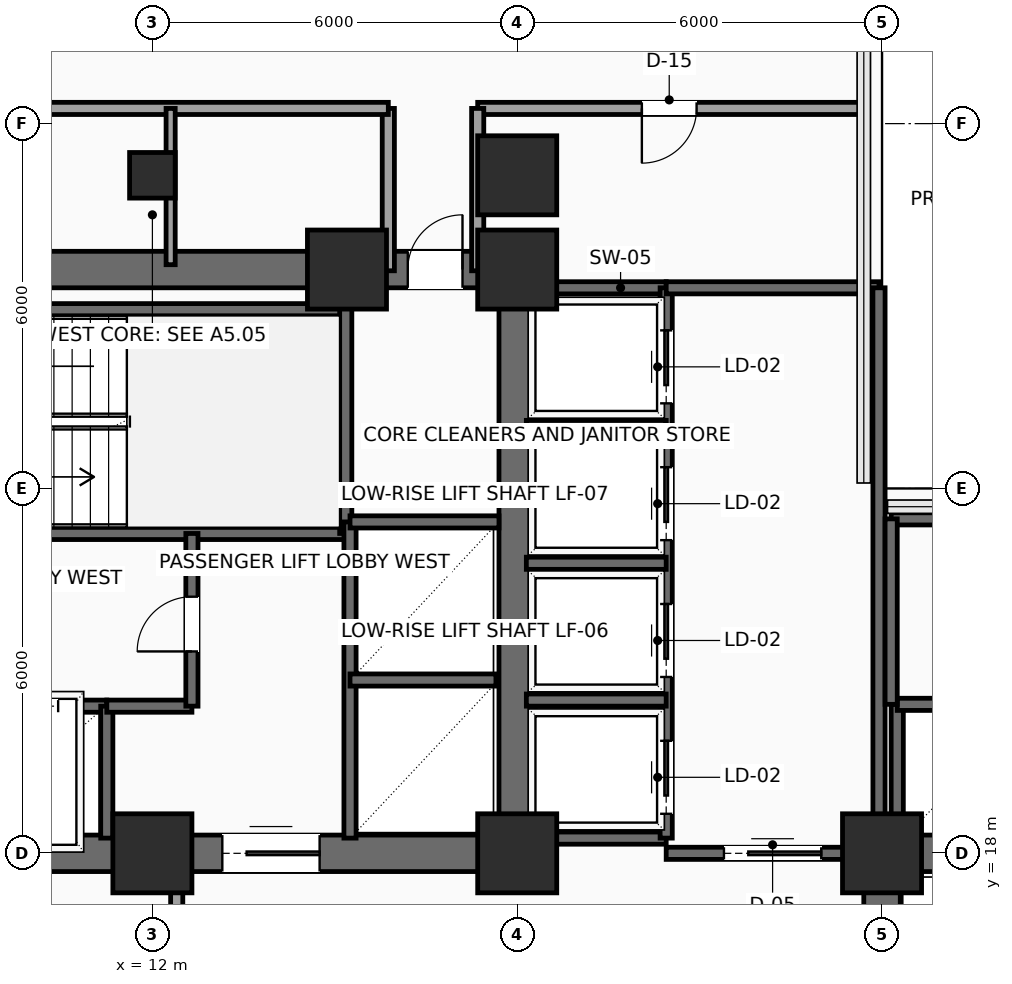
"""IFC4 building model, lengths in metres.
Left out: names, types, materials, properties, quantities, classifications, styles, units other than length and angle.
Written with IfcOpenShell. Run it as: python <this file> out.ifc"""

import sys

from ifc_helpers import new_model, si_unit, direction, frame, frame_2d, origin, origin_2d, place, context, subcontext, project, spatial, rectangle, hollow_rectangle, extrude, element, fill, save


model = new_model("IFC4")
c1 = context("Model", 3, precision=1e-05, world=origin(), true_north=direction((0.0, 1.0)))
c2 = subcontext(c1, "Body", "Model", "MODEL_VIEW")
j1 = project(units=[si_unit("LENGTHUNIT", "METRE"), si_unit("PLANEANGLEUNIT", "RADIAN")], contexts=[c1])
p1 = place(None, origin())
s1 = spatial("IfcSite", under=j1, at=p1, CompositionType="ELEMENT")
p2 = place(p1, origin())
s2 = spatial("IfcBuilding", under=s1, at=p2, CompositionType="ELEMENT")
p3 = place(p2, frame((0.0, 0.0, 87.0)))
s3 = spatial("IfcBuildingStorey", under=s2, at=p3, CompositionType="ELEMENT", Elevation=87.0)
for number, where, z_axis, x_axis in (
    (1, (12.0, 18.0, 0.0), (0.0, 0.0, 1.0), (1.0, 0.0, 0.0)),
    (2, (18.0, 18.0, 0.0), (0.0, 0.0, 1.0), (1.0, 0.0, 0.0)),
    (3, (15.2, 27.6, 0.0), (0.0, 0.0, 1.0), (1.0, 0.0, 0.0)),
    (4, (18.0, 27.6, 0.0), (0.0, 0.0, 1.0), (1.0, 0.0, 0.0)),
    (5, (24.0, 18.0, 0.0), (0.0, 0.0, 1.0), (1.0, 0.0, 0.0)),
):
    element("IfcColumn", number, at=place(p3, frame(where, z_axis=z_axis, x_axis=x_axis)), inside=s3, PredefinedType="COLUMN", context=c2, shape_type="SweptSolid", body=[
        extrude(rectangle(XDim=1.3, YDim=1.3, at=origin_2d()), origin(), (0.0, 0.0, 1.0), 3.9),
    ])
p4 = place(p3, frame((12.0, 29.15, 0.0), z_axis=(0.0, 0.0, 1.0), x_axis=(1.0, 0.0, 0.0)))
e6 = element("IfcColumn", 6, at=p4, inside=s3, PredefinedType="COLUMN", context=c2, shape_type="SweptSolid", body=[
    extrude(hollow_rectangle(XDim=0.75, YDim=0.75, WallThickness=0.035, InnerFilletRadius=0.035, OuterFilletRadius=0.05, at=origin_2d()), origin(), (0.0, 0.0, 1.0), 3.9),
])
p5 = place(p3, frame((18.0, 29.15, 0.0), z_axis=(0.0, 0.0, 1.0), x_axis=(1.0, 0.0, 0.0)))
e7 = element("IfcColumn", 7, at=p5, inside=s3, PredefinedType="COLUMN", context=c2, shape_type="SweptSolid", body=[
    extrude(rectangle(XDim=1.3, YDim=1.3, at=origin_2d()), origin(), (0.0, 0.0, 1.0), 3.9),
])
p6 = place(p3, frame((6.0, 18.0, 0.0), z_axis=(0.0, 0.0, 1.0), x_axis=(1.0, 0.0, 0.0)))
e8 = element("IfcWall", 8, at=p6, inside=s3, PredefinedType="SHEAR", context=c2, shape_type="SweptSolid", body=[
    extrude(rectangle(XDim=12.0, YDim=0.6, at=frame_2d((6.0, 0.0))), origin(), (0.0, 0.0, 1.0), 3.65),
])
p7 = place(p6, frame((7.15, 0.0, 0.0)))
e9 = element("IfcOpeningElement", 9, at=p7, cuts=e8, PredefinedType="OPENING", context=c2, shape_type="SweptSolid", body=[
    extrude(rectangle(XDim=1.6, YDim=2.3, at=frame_2d((0.8, 1.15))), frame((0.0, 0.31, 0.0), z_axis=(0.0, -1.0, 0.0), x_axis=(1.0, 0.0, 0.0)), (0.0, 0.0, 1.0), 0.62),
])
p8 = place(p3, frame((6.0, 27.6, 0.0), z_axis=(0.0, 0.0, 1.0), x_axis=(1.0, 0.0, 0.0)))
e10 = element("IfcWall", 10, at=p8, inside=s3, PredefinedType="SHEAR", context=c2, shape_type="SweptSolid", body=[
    extrude(rectangle(XDim=12.0, YDim=0.6, at=frame_2d((6.0, 0.0))), origin(), (0.0, 0.0, 1.0), 3.65),
])
p9 = place(p8, frame((10.2, 0.0, 0.0)))
e11 = element("IfcOpeningElement", 11, at=p9, cuts=e10, PredefinedType="OPENING", context=c2, shape_type="SweptSolid", body=[
    extrude(rectangle(XDim=0.9, YDim=2.15, at=frame_2d((0.45, 1.075))), frame((0.0, 0.31, 0.0), z_axis=(0.0, -1.0, 0.0), x_axis=(1.0, 0.0, 0.0)), (0.0, 0.0, 1.0), 0.62),
])
for number, where, z_axis, x_axis in (
    (12, (18.0, 18.0, 0.0), (0.0, 0.0, 1.0), (0.0, 1.0, 0.0)),
    (13, (24.0, 18.0, 0.0), (0.0, 0.0, 1.0), (1.0, 0.0, 0.0)),
):
    element("IfcWall", number, at=place(p3, frame(where, z_axis=z_axis, x_axis=x_axis)), inside=s3, PredefinedType="SHEAR", context=c2, shape_type="SweptSolid", body=[
        extrude(rectangle(XDim=9.6, YDim=0.6, at=frame_2d((4.8, 0.0))), origin(), (0.0, 0.0, 1.0), 3.65),
    ])
p10 = place(p3, frame((24.0, 6.0, 0.0), z_axis=(0.0, 0.0, 1.0), x_axis=(0.0, 1.0, 0.0)))
e14 = element("IfcWall", 14, at=p10, inside=s3, PredefinedType="SHEAR", context=c2, shape_type="SweptSolid", body=[
    extrude(rectangle(XDim=12.0, YDim=0.6, at=frame_2d((6.0, 0.0))), origin(), (0.0, 0.0, 1.0), 3.65),
])
p11 = place(p10, frame((7.15, 0.0, 0.0)))
e15 = element("IfcOpeningElement", 15, at=p11, cuts=e14, PredefinedType="OPENING", context=c2, shape_type="SweptSolid", body=[
    extrude(rectangle(XDim=1.6, YDim=2.3, at=frame_2d((0.8, 1.15))), frame((0.0, 0.31, 0.0), z_axis=(0.0, -1.0, 0.0), x_axis=(1.0, 0.0, 0.0)), (0.0, 0.0, 1.0), 0.62),
])
p12 = place(p3, frame((6.3, 23.26, 0.0), z_axis=(0.0, 0.0, 1.0), x_axis=(1.0, 0.0, 0.0)))
e16 = element("IfcWall", 16, at=p12, inside=s3, PredefinedType="SHEAR", context=c2, shape_type="SweptSolid", body=[
    extrude(rectangle(XDim=8.88, YDim=0.2, at=frame_2d((4.44, 0.0))), origin(), (0.0, 0.0, 1.0), 3.65),
])
p13 = place(p12, frame((0.35, 0.0, 0.0)))
e17 = element("IfcOpeningElement", 17, at=p13, cuts=e16, PredefinedType="OPENING", context=c2, shape_type="SweptSolid", body=[
    extrude(rectangle(XDim=1.1, YDim=2.2, at=frame_2d((0.55, 1.1))), frame((0.0, 0.11, 0.0), z_axis=(0.0, -1.0, 0.0), x_axis=(1.0, 0.0, 0.0)), (0.0, 0.0, 1.0), 0.22),
])
p14 = place(p3, frame((6.3, 26.94, 0.0), z_axis=(0.0, 0.0, 1.0), x_axis=(1.0, 0.0, 0.0)))
e18 = element("IfcWall", 18, at=p14, inside=s3, PredefinedType="SHEAR", context=c2, shape_type="SweptSolid", body=[
    extrude(rectangle(XDim=8.88, YDim=0.2, at=frame_2d((4.44, 0.0))), origin(), (0.0, 0.0, 1.0), 3.65),
])
p15 = place(p3, frame((15.18, 23.26, 0.0), z_axis=(0.0, 0.0, 1.0), x_axis=(0.0, 1.0, 0.0)))
e19 = element("IfcWall", 19, at=p15, inside=s3, PredefinedType="SHEAR", context=c2, shape_type="SweptSolid", body=[
    extrude(rectangle(XDim=4.04, YDim=0.2, at=frame_2d((2.02, 0.0))), origin(), (0.0, 0.0, 1.0), 3.65),
])
p16 = place(p3, frame((6.3, 20.42, 0.0), z_axis=(0.0, 0.0, 1.0), x_axis=(1.0, 0.0, 0.0)))
e20 = element("IfcWall", 20, at=p16, inside=s3, PredefinedType="SHEAR", context=c2, shape_type="SweptSolid", body=[
    extrude(rectangle(XDim=4.95, YDim=0.2, at=frame_2d((2.475, 0.0))), origin(), (0.0, 0.0, 1.0), 3.65),
])
p17 = place(p16, frame((0.65, 0.0, 0.0)))
e21 = element("IfcOpeningElement", 21, at=p17, cuts=e20, PredefinedType="OPENING", context=c2, shape_type="SweptSolid", body=[
    extrude(rectangle(XDim=1.1, YDim=2.2, at=frame_2d((0.55, 1.1))), frame((0.0, 0.11, 0.0), z_axis=(0.0, -1.0, 0.0), x_axis=(1.0, 0.0, 0.0)), (0.0, 0.0, 1.0), 0.22),
])
p18 = place(p16, frame((3.05, 0.0, 0.0)))
e22 = element("IfcOpeningElement", 22, at=p18, cuts=e20, PredefinedType="OPENING", context=c2, shape_type="SweptSolid", body=[
    extrude(rectangle(XDim=1.1, YDim=2.2, at=frame_2d((0.55, 1.1))), frame((0.0, 0.11, 0.0), z_axis=(0.0, -1.0, 0.0), x_axis=(1.0, 0.0, 0.0)), (0.0, 0.0, 1.0), 0.22),
])
p19 = place(p3, frame((11.25, 18.25, 0.0), z_axis=(0.0, 0.0, 1.0), x_axis=(0.0, 1.0, 0.0)))
e23 = element("IfcWall", 23, at=p19, inside=s3, PredefinedType="SHEAR", context=c2, shape_type="SweptSolid", body=[
    extrude(rectangle(XDim=2.17, YDim=0.2, at=frame_2d((1.085, 0.0))), origin(), (0.0, 0.0, 1.0), 3.65),
])
p20 = place(p3, frame((11.25, 20.42, 0.0), z_axis=(0.0, 0.0, 1.0), x_axis=(1.0, 0.0, 0.0)))
e24 = element("IfcWall", 24, at=p20, inside=s3, PredefinedType="SHEAR", context=c2, shape_type="SweptSolid", body=[
    extrude(rectangle(XDim=1.4, YDim=0.2, at=frame_2d((0.7, 0.0))), origin(), (0.0, 0.0, 1.0), 3.65),
])
p21 = place(p3, frame((12.65, 20.42, 0.0), z_axis=(0.0, 0.0, 1.0), x_axis=(0.0, 1.0, 0.0)))
e25 = element("IfcWall", 25, at=p21, inside=s3, PredefinedType="SHEAR", context=c2, shape_type="SweptSolid", body=[
    extrude(rectangle(XDim=2.84, YDim=0.2, at=frame_2d((1.42, 0.0))), origin(), (0.0, 0.0, 1.0), 3.65),
])
p22 = place(p21, frame((0.9, 0.0, 0.0)))
e26 = element("IfcOpeningElement", 26, at=p22, cuts=e25, PredefinedType="OPENING", context=c2, shape_type="SweptSolid", body=[
    extrude(rectangle(XDim=0.9, YDim=2.15, at=frame_2d((0.45, 1.075))), frame((0.0, 0.11, 0.0), z_axis=(0.0, -1.0, 0.0), x_axis=(1.0, 0.0, 0.0)), (0.0, 0.0, 1.0), 0.22),
])
p23 = place(p3, frame((15.25, 18.25, 0.0), z_axis=(0.0, 0.0, 1.0), x_axis=(0.0, 1.0, 0.0)))
e27 = element("IfcWall", 27, at=p23, inside=s3, PredefinedType="SHEAR", context=c2, shape_type="SweptSolid", body=[
    extrude(rectangle(XDim=5.2, YDim=0.2, at=frame_2d((2.6, 0.0))), origin(), (0.0, 0.0, 1.0), 3.65),
])
p24 = place(p3, frame((15.25, 20.85, 0.0), z_axis=(0.0, 0.0, 1.0), x_axis=(1.0, 0.0, 0.0)))
e28 = element("IfcWall", 28, at=p24, inside=s3, PredefinedType="SHEAR", context=c2, shape_type="SweptSolid", body=[
    extrude(rectangle(XDim=2.4, YDim=0.2, at=frame_2d((1.2, 0.0))), origin(), (0.0, 0.0, 1.0), 3.65),
])
p25 = place(p3, frame((15.25, 23.45, 0.0), z_axis=(0.0, 0.0, 1.0), x_axis=(1.0, 0.0, 0.0)))
e29 = element("IfcWall", 29, at=p25, inside=s3, PredefinedType="SHEAR", context=c2, shape_type="SweptSolid", body=[
    extrude(rectangle(XDim=2.45, YDim=0.2, at=frame_2d((1.225, 0.0))), origin(), (0.0, 0.0, 1.0), 3.65),
])
for number, where, z_axis, x_axis in (
    (30, (18.1, 27.3, 0.0), (0.0, 0.0, 1.0), (1.0, 0.0, 0.0)),
    (31, (18.1, 18.25, 0.0), (0.0, 0.0, 1.0), (1.0, 0.0, 0.0)),
):
    element("IfcWall", number, at=place(p3, frame(where, z_axis=z_axis, x_axis=x_axis)), inside=s3, PredefinedType="SHEAR", context=c2, shape_type="SweptSolid", body=[
        extrude(rectangle(XDim=2.35, YDim=0.2, at=frame_2d((1.175, 0.0))), origin(), (0.0, 0.0, 1.0), 3.65),
    ])
p26 = place(p3, frame((20.45, 18.25, 0.0), z_axis=(0.0, 0.0, 1.0), x_axis=(0.0, 1.0, 0.0)))
e32 = element("IfcWall", 32, at=p26, inside=s3, PredefinedType="SHEAR", context=c2, shape_type="SweptSolid", body=[
    extrude(rectangle(XDim=9.05, YDim=0.2, at=frame_2d((4.525, 0.0))), origin(), (0.0, 0.0, 1.0), 3.65),
])
p27 = place(p26, frame((0.4, 0.0, 0.0)))
e33 = element("IfcOpeningElement", 33, at=p27, cuts=e32, PredefinedType="OPENING", context=c2, shape_type="SweptSolid", body=[
    extrude(rectangle(XDim=1.2, YDim=2.2, at=frame_2d((0.6, 1.1))), frame((0.0, 0.11, 0.0), z_axis=(0.0, -1.0, 0.0), x_axis=(1.0, 0.0, 0.0)), (0.0, 0.0, 1.0), 0.22),
])
p28 = place(p26, frame((2.65, 0.0, 0.0)))
e34 = element("IfcOpeningElement", 34, at=p28, cuts=e32, PredefinedType="OPENING", context=c2, shape_type="SweptSolid", body=[
    extrude(rectangle(XDim=1.2, YDim=2.2, at=frame_2d((0.6, 1.1))), frame((0.0, 0.11, 0.0), z_axis=(0.0, -1.0, 0.0), x_axis=(1.0, 0.0, 0.0)), (0.0, 0.0, 1.0), 0.22),
])
p29 = place(p26, frame((4.9, 0.0, 0.0)))
e35 = element("IfcOpeningElement", 35, at=p29, cuts=e32, PredefinedType="OPENING", context=c2, shape_type="SweptSolid", body=[
    extrude(rectangle(XDim=1.2, YDim=2.2, at=frame_2d((0.6, 1.1))), frame((0.0, 0.11, 0.0), z_axis=(0.0, -1.0, 0.0), x_axis=(1.0, 0.0, 0.0)), (0.0, 0.0, 1.0), 0.22),
])
p30 = place(p26, frame((7.15, 0.0, 0.0)))
e36 = element("IfcOpeningElement", 36, at=p30, cuts=e32, PredefinedType="OPENING", context=c2, shape_type="SweptSolid", body=[
    extrude(rectangle(XDim=1.2, YDim=2.2, at=frame_2d((0.6, 1.1))), frame((0.0, 0.11, 0.0), z_axis=(0.0, -1.0, 0.0), x_axis=(1.0, 0.0, 0.0)), (0.0, 0.0, 1.0), 0.22),
])
for number, where, z_axis, x_axis in (
    (37, (18.15, 20.52, 0.0), (0.0, 0.0, 1.0), (1.0, 0.0, 0.0)),
    (38, (18.15, 22.77, 0.0), (0.0, 0.0, 1.0), (1.0, 0.0, 0.0)),
    (39, (18.15, 25.02, 0.0), (0.0, 0.0, 1.0), (1.0, 0.0, 0.0)),
):
    element("IfcWall", number, at=place(p3, frame(where, z_axis=z_axis, x_axis=x_axis)), inside=s3, PredefinedType="SHEAR", context=c2, shape_type="SweptSolid", body=[
        extrude(rectangle(XDim=2.3, YDim=0.2, at=frame_2d((1.15, 0.0))), origin(), (0.0, 0.0, 1.0), 3.65),
    ])
p31 = place(p3, frame((20.45, 18.0, 0.0), z_axis=(0.0, 0.0, 1.0), x_axis=(1.0, 0.0, 0.0)))
e40 = element("IfcWall", 40, at=p31, inside=s3, PredefinedType="SHEAR", context=c2, shape_type="SweptSolid", body=[
    extrude(rectangle(XDim=3.5, YDim=0.2, at=frame_2d((1.75, 0.0))), origin(), (0.0, 0.0, 1.0), 3.65),
])
p32 = place(p31, frame((0.95, 0.0, 0.0)))
e41 = element("IfcOpeningElement", 41, at=p32, cuts=e40, PredefinedType="OPENING", context=c2, shape_type="SweptSolid", body=[
    extrude(rectangle(XDim=1.6, YDim=2.3, at=frame_2d((0.8, 1.15))), frame((0.0, 0.11, 0.0), z_axis=(0.0, -1.0, 0.0), x_axis=(1.0, 0.0, 0.0)), (0.0, 0.0, 1.0), 0.22),
])
p33 = place(p3, frame((20.45, 27.3, 0.0), z_axis=(0.0, 0.0, 1.0), x_axis=(1.0, 0.0, 0.0)))
e42 = element("IfcWall", 42, at=p33, inside=s3, PredefinedType="SHEAR", context=c2, shape_type="SweptSolid", body=[
    extrude(rectangle(XDim=3.5, YDim=0.2, at=frame_2d((1.75, 0.0))), origin(), (0.0, 0.0, 1.0), 3.65),
])
p34 = place(p3, frame((23.95, 18.0, 0.0), z_axis=(0.0, 0.0, 1.0), x_axis=(0.0, 1.0, 0.0)))
e43 = element("IfcWall", 43, at=p34, inside=s3, PredefinedType="SHEAR", context=c2, shape_type="SweptSolid", body=[
    extrude(rectangle(XDim=9.3, YDim=0.2, at=frame_2d((4.65, 0.0))), origin(), (0.0, 0.0, 1.0), 3.65),
])
p35 = place(p3, frame((24.25, 18.1, 0.0), z_axis=(0.0, 0.0, 1.0), x_axis=(0.0, 1.0, 0.0)))
e44 = element("IfcWall", 44, at=p35, inside=s3, PredefinedType="SHEAR", context=c2, shape_type="SweptSolid", body=[
    extrude(rectangle(XDim=2.35, YDim=0.2, at=frame_2d((1.175, 0.0))), origin(), (0.0, 0.0, 1.0), 3.65),
])
p36 = place(p3, frame((24.25, 20.45, 0.0), z_axis=(0.0, 0.0, 1.0), x_axis=(1.0, 0.0, 0.0)))
e45 = element("IfcWall", 45, at=p36, inside=s3, PredefinedType="SHEAR", context=c2, shape_type="SweptSolid", body=[
    extrude(rectangle(XDim=9.05, YDim=0.2, at=frame_2d((4.525, 0.0))), origin(), (0.0, 0.0, 1.0), 3.65),
])
p37 = place(p3, frame((24.15, 23.5, 0.0), z_axis=(0.0, 0.0, 1.0), x_axis=(1.0, 0.0, 0.0)))
e46 = element("IfcWall", 46, at=p37, inside=s3, PredefinedType="SHEAR", context=c2, shape_type="SweptSolid", body=[
    extrude(rectangle(XDim=9.15, YDim=0.2, at=frame_2d((4.575, 0.0))), origin(), (0.0, 0.0, 1.0), 3.65),
])
p38 = place(p3, frame((24.15, 20.45, 0.0), z_axis=(0.0, 0.0, 1.0), x_axis=(0.0, 1.0, 0.0)))
e47 = element("IfcWall", 47, at=p38, inside=s3, PredefinedType="SHEAR", context=c2, shape_type="SweptSolid", body=[
    extrude(rectangle(XDim=3.05, YDim=0.2, at=frame_2d((1.525, 0.0))), origin(), (0.0, 0.0, 1.0), 3.65),
])
p39 = place(p3, frame((23.7, 30.25, 0.0), z_axis=(0.0, 0.0, 1.0), x_axis=(-1.0, 0.0, 0.0)))
e48 = element("IfcWall", 48, at=p39, inside=s3, PredefinedType="SOLIDWALL", context=c2, shape_type="SweptSolid", body=[
    extrude(rectangle(XDim=6.35, YDim=0.2, at=frame_2d((3.175, 0.0))), origin(), (0.0, 0.0, 1.0), 3.65),
])
p40 = place(p39, frame((2.75, 0.0, 0.0)))
e49 = element("IfcOpeningElement", 49, at=p40, cuts=e48, PredefinedType="OPENING", context=c2, shape_type="SweptSolid", body=[
    extrude(rectangle(XDim=0.9, YDim=2.1, at=frame_2d((0.45, 1.05))), frame((0.0, 0.11, 0.0), z_axis=(0.0, -1.0, 0.0), x_axis=(1.0, 0.0, 0.0)), (0.0, 0.0, 1.0), 0.22),
])
for number, where, z_axis, x_axis in (
    (50, (17.35, 30.25, 0.0), (0.0, 0.0, 1.0), (0.0, -1.0, 0.0)),
    (51, (15.88, 27.58, 0.0), (0.0, 0.0, 1.0), (0.0, 1.0, 0.0)),
):
    element("IfcWall", number, at=place(p3, frame(where, z_axis=z_axis, x_axis=x_axis)), inside=s3, PredefinedType="SOLIDWALL", context=c2, shape_type="SweptSolid", body=[
        extrude(rectangle(XDim=2.67, YDim=0.2, at=frame_2d((1.335, 0.0))), origin(), (0.0, 0.0, 1.0), 3.65),
    ])
p41 = place(p3, frame((15.88, 30.25, 0.0), z_axis=(0.0, 0.0, 1.0), x_axis=(-1.0, 0.0, 0.0)))
e52 = element("IfcWall", 52, at=p41, inside=s3, PredefinedType="SOLIDWALL", context=c2, shape_type="SweptSolid", body=[
    extrude(rectangle(XDim=10.63, YDim=0.2, at=frame_2d((5.315, 0.0))), origin(), (0.0, 0.0, 1.0), 3.65),
])
p42 = place(p41, frame((6.13, 0.0, 0.0)))
e53 = element("IfcOpeningElement", 53, at=p42, cuts=e52, PredefinedType="OPENING", context=c2, shape_type="SweptSolid", body=[
    extrude(rectangle(XDim=0.9, YDim=2.1, at=frame_2d((0.45, 1.05))), frame((0.0, 0.11, 0.0), z_axis=(0.0, -1.0, 0.0), x_axis=(1.0, 0.0, 0.0)), (0.0, 0.0, 1.0), 0.22),
])
p43 = place(p3, frame((12.4, 16.9, 0.0), z_axis=(0.0, 0.0, 1.0), x_axis=(0.0, 1.0, 0.0)))
e54 = element("IfcWall", 54, at=p43, inside=s3, PredefinedType="SOLIDWALL", context=c2, shape_type="SweptSolid", body=[
    extrude(rectangle(XDim=1.05, YDim=0.2, at=frame_2d((0.525, 0.0))), origin(), (0.0, 0.0, 1.0), 3.65),
])
p44 = place(p3, frame((12.3, 27.68, 0.0), z_axis=(0.0, 0.0, 1.0), x_axis=(0.0, 1.0, 0.0)))
e55 = element("IfcWall", 55, at=p44, inside=s3, PredefinedType="PARTITIONING", context=c2, shape_type="SweptSolid", body=[
    extrude(rectangle(XDim=2.57, YDim=0.15, at=frame_2d((1.285, 0.0))), origin(), (0.0, 0.0, 1.0), 2.992),
])
p45 = place(p7, origin())
e56 = element("IfcDoor", 56, at=p45, inside=s3, OperationType="DOUBLE_DOOR_SLIDING", PredefinedType="DOOR", context=c2, shape_type="SweptSolid", body=[
    extrude(rectangle(XDim=1.6, YDim=2.3, at=frame_2d((0.8, 1.15))), frame((0.0, 0.025, 0.0), z_axis=(0.0, -1.0, 0.0), x_axis=(1.0, 0.0, 0.0)), (0.0, 0.0, 1.0), 0.05),
])
fill(e9, e56)
p46 = place(p9, origin())
e57 = element("IfcDoor", 57, at=p46, inside=s3, OperationType="SINGLE_SWING_RIGHT", PredefinedType="DOOR", context=c2, shape_type="SweptSolid", body=[
    extrude(rectangle(XDim=0.9, YDim=2.15, at=frame_2d((0.45, 1.075))), frame((0.0, 0.025, 0.0), z_axis=(0.0, -1.0, 0.0), x_axis=(1.0, 0.0, 0.0)), (0.0, 0.0, 1.0), 0.05),
])
fill(e11, e57)
p47 = place(p18, origin())
e58 = element("IfcDoor", 58, at=p47, inside=s3, OperationType="SLIDING_TO_LEFT", PredefinedType="DOOR", context=c2, shape_type="SweptSolid", body=[
    extrude(rectangle(XDim=1.1, YDim=2.2, at=frame_2d((0.55, 1.1))), frame((0.0, 0.025, 0.0), z_axis=(0.0, -1.0, 0.0), x_axis=(1.0, 0.0, 0.0)), (0.0, 0.0, 1.0), 0.05),
])
fill(e22, e58)
p48 = place(p22, origin())
e59 = element("IfcDoor", 59, at=p48, inside=s3, OperationType="SINGLE_SWING_LEFT", PredefinedType="DOOR", context=c2, shape_type="SweptSolid", body=[
    extrude(rectangle(XDim=0.9, YDim=2.15, at=frame_2d((0.45, 1.075))), frame((0.0, 0.025, 0.0), z_axis=(0.0, -1.0, 0.0), x_axis=(1.0, 0.0, 0.0)), (0.0, 0.0, 1.0), 0.05),
])
fill(e26, e59)
p49 = place(p27, origin())
e60 = element("IfcDoor", 60, at=p49, inside=s3, OperationType="SLIDING_TO_RIGHT", PredefinedType="DOOR", context=c2, shape_type="SweptSolid", body=[
    extrude(rectangle(XDim=1.2, YDim=2.2, at=frame_2d((0.6, 1.1))), frame((0.0, 0.025, 0.0), z_axis=(0.0, -1.0, 0.0), x_axis=(1.0, 0.0, 0.0)), (0.0, 0.0, 1.0), 0.05),
])
fill(e33, e60)
p50 = place(p28, origin())
e61 = element("IfcDoor", 61, at=p50, inside=s3, OperationType="SLIDING_TO_RIGHT", PredefinedType="DOOR", context=c2, shape_type="SweptSolid", body=[
    extrude(rectangle(XDim=1.2, YDim=2.2, at=frame_2d((0.6, 1.1))), frame((0.0, 0.025, 0.0), z_axis=(0.0, -1.0, 0.0), x_axis=(1.0, 0.0, 0.0)), (0.0, 0.0, 1.0), 0.05),
])
fill(e34, e61)
p51 = place(p29, origin())
e62 = element("IfcDoor", 62, at=p51, inside=s3, OperationType="SLIDING_TO_RIGHT", PredefinedType="DOOR", context=c2, shape_type="SweptSolid", body=[
    extrude(rectangle(XDim=1.2, YDim=2.2, at=frame_2d((0.6, 1.1))), frame((0.0, 0.025, 0.0), z_axis=(0.0, -1.0, 0.0), x_axis=(1.0, 0.0, 0.0)), (0.0, 0.0, 1.0), 0.05),
])
fill(e35, e62)
p52 = place(p30, origin())
e63 = element("IfcDoor", 63, at=p52, inside=s3, OperationType="SLIDING_TO_RIGHT", PredefinedType="DOOR", context=c2, shape_type="SweptSolid", body=[
    extrude(rectangle(XDim=1.2, YDim=2.2, at=frame_2d((0.6, 1.1))), frame((0.0, 0.025, 0.0), z_axis=(0.0, -1.0, 0.0), x_axis=(1.0, 0.0, 0.0)), (0.0, 0.0, 1.0), 0.05),
])
fill(e36, e63)
p53 = place(p32, origin())
e64 = element("IfcDoor", 64, at=p53, inside=s3, OperationType="DOUBLE_DOOR_SLIDING", PredefinedType="DOOR", context=c2, shape_type="SweptSolid", body=[
    extrude(rectangle(XDim=1.6, YDim=2.3, at=frame_2d((0.8, 1.15))), frame((0.0, 0.025, 0.0), z_axis=(0.0, -1.0, 0.0), x_axis=(1.0, 0.0, 0.0)), (0.0, 0.0, 1.0), 0.05),
])
fill(e41, e64)
p54 = place(p40, origin())
e65 = element("IfcDoor", 65, at=p54, inside=s3, OperationType="SINGLE_SWING_RIGHT", PredefinedType="DOOR", context=c2, shape_type="SweptSolid", body=[
    extrude(rectangle(XDim=0.9, YDim=2.1, at=frame_2d((0.45, 1.05))), frame((0.0, 0.025, 0.0), z_axis=(0.0, -1.0, 0.0), x_axis=(1.0, 0.0, 0.0)), (0.0, 0.0, 1.0), 0.05),
])
fill(e49, e65)
save(model, sys.argv[1])
